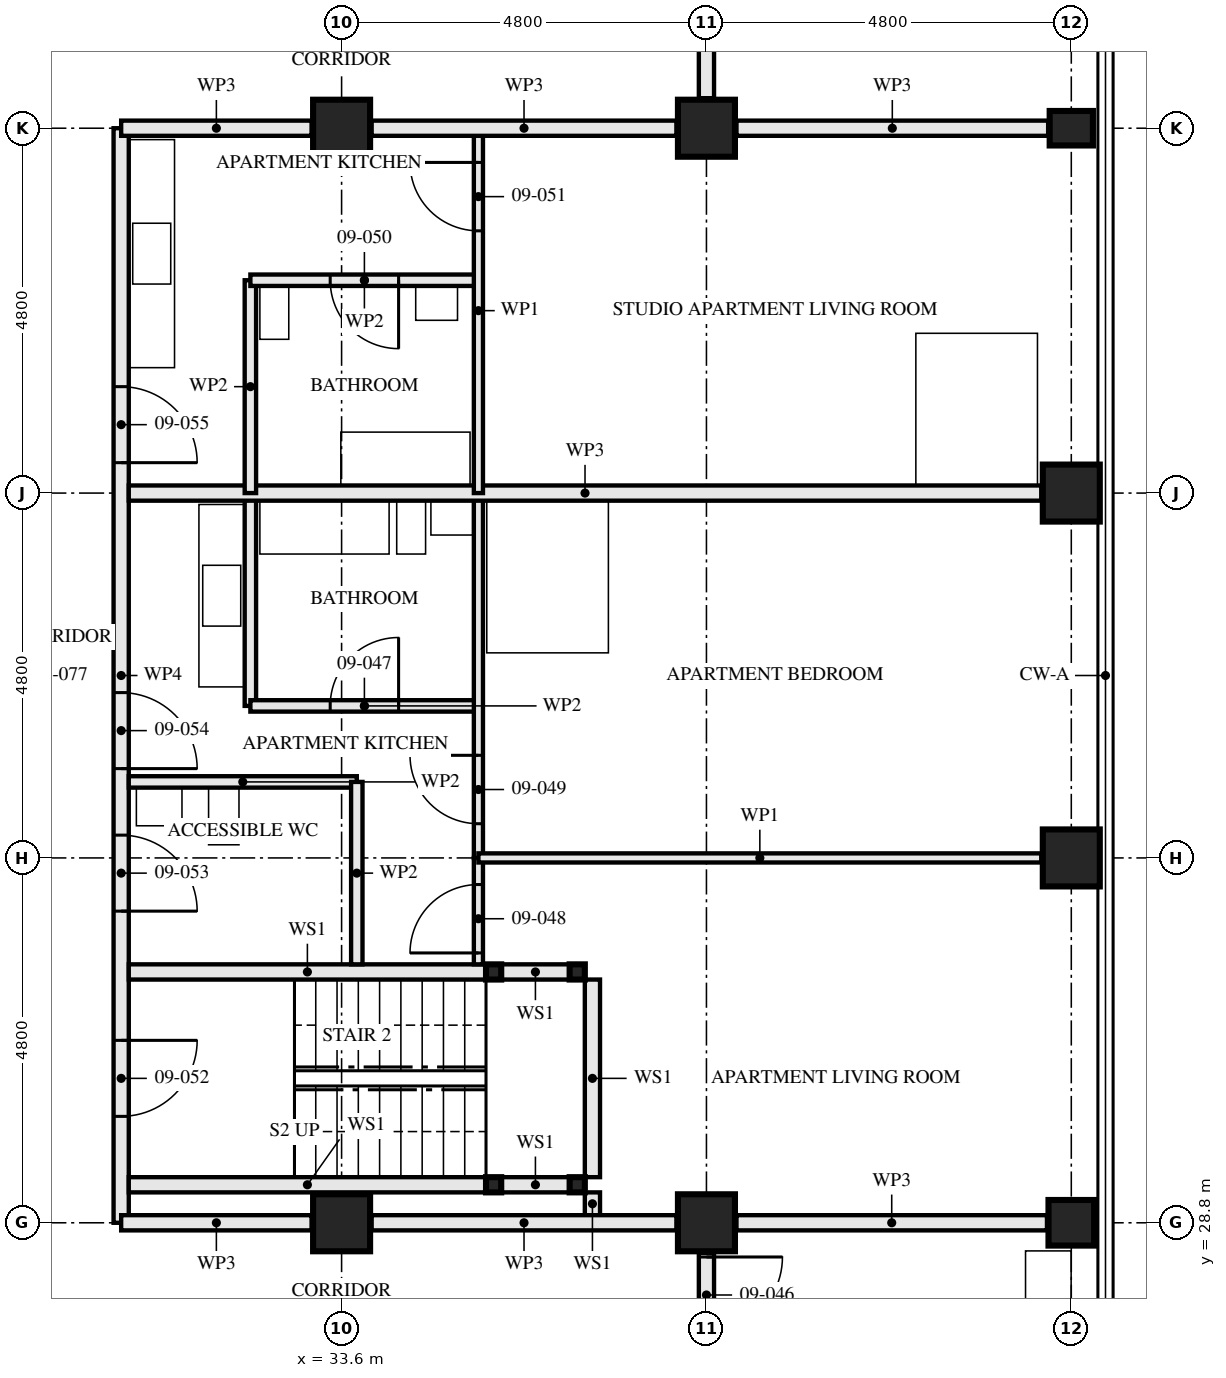
"""IFC4 building model, lengths in metres.
Left out: names, types, materials, properties, quantities, classifications, styles, units other than length and angle.
Written with IfcOpenShell. Run it as: python <this file> out.ifc"""

import sys

from ifc_helpers import new_model, si_unit, direction, frame, frame_2d, origin, origin_2d, place, context, subcontext, project, spatial, rectangle, hollow_rectangle, i_section, extrude, element, fill, save


model = new_model("IFC4")
c1 = context("Model", 3, precision=1e-05, world=origin(), true_north=direction((0.0, 1.0)))
c2 = subcontext(c1, "Body", "Model", "MODEL_VIEW")
j1 = project(units=[si_unit("LENGTHUNIT", "METRE"), si_unit("PLANEANGLEUNIT", "RADIAN")], contexts=[c1])
p1 = place(None, origin())
s1 = spatial("IfcSite", under=j1, at=p1, CompositionType="ELEMENT")
p2 = place(p1, origin())
s2 = spatial("IfcBuilding", under=s1, at=p2, CompositionType="ELEMENT")
p3 = place(p2, frame((0.0, 0.0, 37.5)))
s3 = spatial("IfcBuildingStorey", under=s2, at=p3, CompositionType="ELEMENT", Elevation=37.5)
for number, where, z_axis, x_axis in (
    (1, (33.6, 28.8, 0.0), (0.0, 0.0, 1.0), (0.0, 1.0, 0.0)),
    (2, (33.6, 43.2, 0.0), (0.0, 0.0, 1.0), (0.0, 1.0, 0.0)),
    (3, (38.4, 28.8, 0.0), (0.0, 0.0, 1.0), (0.0, 1.0, 0.0)),
    (4, (38.4, 43.2, 0.0), (0.0, 0.0, 1.0), (0.0, 1.0, 0.0)),
):
    element("IfcColumn", number, at=place(p3, frame(where, z_axis=z_axis, x_axis=x_axis)), inside=s3, PredefinedType="COLUMN", context=c2, shape_type="SweptSolid", body=[
        extrude(hollow_rectangle(XDim=0.75, YDim=0.75, WallThickness=0.08, at=origin_2d()), origin(), (0.0, 0.0, 1.0), 3.5),
    ])
p4 = place(p3, frame((43.2, 28.8, 0.0), z_axis=(0.0, 0.0, 1.0), x_axis=(0.0, 1.0, 0.0)))
e5 = element("IfcColumn", 5, at=p4, inside=s3, PredefinedType="COLUMN", context=c2, shape_type="SweptSolid", body=[
    extrude(hollow_rectangle(XDim=0.6, YDim=0.6, WallThickness=0.08, at=origin_2d()), origin(), (0.0, 0.0, 1.0), 3.5),
])
for number, where, z_axis, x_axis in (
    (6, (43.2, 33.6, 0.0), (0.0, 0.0, 1.0), (1.0, 0.0, 0.0)),
    (7, (43.2, 38.4, 0.0), (0.0, 0.0, 1.0), (1.0, 0.0, 0.0)),
):
    element("IfcColumn", number, at=place(p3, frame(where, z_axis=z_axis, x_axis=x_axis)), inside=s3, PredefinedType="COLUMN", context=c2, shape_type="SweptSolid", body=[
        extrude(hollow_rectangle(XDim=0.75, YDim=0.75, WallThickness=0.08, at=origin_2d()), origin(), (0.0, 0.0, 1.0), 3.5),
    ])
p5 = place(p3, frame((43.2, 43.2, 0.0), z_axis=(0.0, 0.0, 1.0), x_axis=(0.0, 1.0, 0.0)))
e8 = element("IfcColumn", 8, at=p5, inside=s3, PredefinedType="COLUMN", context=c2, shape_type="SweptSolid", body=[
    extrude(i_section(OverallWidth=0.454, OverallDepth=0.569, WebThickness=0.078, FlangeThickness=0.125, FilletRadius=0.015, at=origin_2d()), origin(), (0.0, 0.0, 1.0), 3.5),
])
for number, where, z_axis, x_axis in (
    (9, (36.7, 29.3, 0.0), (0.0, 0.0, 1.0), (1.0, 0.0, 0.0)),
    (10, (36.7, 32.1, 0.0), (0.0, 0.0, 1.0), (1.0, 0.0, 0.0)),
    (11, (35.6, 29.3, 0.0), (0.0, 0.0, 1.0), (1.0, 0.0, 0.0)),
    (12, (35.6, 32.1, 0.0), (0.0, 0.0, 1.0), (1.0, 0.0, 0.0)),
):
    element("IfcColumn", number, at=place(p3, frame(where, z_axis=z_axis, x_axis=x_axis)), inside=s3, PredefinedType="COLUMN", context=c2, shape_type="SweptSolid", body=[
        extrude(hollow_rectangle(XDim=0.2, YDim=0.2, WallThickness=0.008, at=origin_2d()), origin(), (0.0, 0.0, 1.0), 3.33),
    ])
p6 = place(p3, frame((38.4, 26.8, 0.0), z_axis=(0.0, 0.0, 1.0), x_axis=(0.0, 1.0, 0.0)))
e13 = element("IfcWall", 13, at=p6, inside=s3, PredefinedType="PARTITIONING", context=c2, shape_type="SweptSolid", body=[
    extrude(rectangle(XDim=1.605, YDim=0.2, at=frame_2d((0.802, 0.0))), origin(), (0.0, 0.0, 1.0), 3.33),
])
p7 = place(p6, frame((0.55, 0.0, 0.0)))
e14 = element("IfcOpeningElement", 14, at=p7, cuts=e13, PredefinedType="OPENING", context=c2, shape_type="SweptSolid", body=[
    extrude(rectangle(XDim=1.0, YDim=2.1, at=frame_2d((0.5, 1.05))), frame((0.0, 0.111, 0.0), z_axis=(0.0, -1.0, 0.0), x_axis=(1.0, 0.0, 0.0)), (0.0, 0.0, 1.0), 0.221),
])
p8 = place(p3, frame((36.6, 29.3, 0.0), z_axis=(0.0, 0.0, 1.0), x_axis=(-1.0, 0.0, 0.0)))
e15 = element("IfcWall", 15, at=p8, inside=s3, PredefinedType="SOLIDWALL", context=c2, shape_type="SweptSolid", body=[
    extrude(rectangle(XDim=0.9, YDim=0.2, at=frame_2d((0.45, 0.0))), origin(), (0.0, 0.0, 1.0), 2.99),
])
p9 = place(p3, frame((35.5, 29.3, 0.0), z_axis=(0.0, 0.0, 1.0), x_axis=(-1.0, 0.0, 0.0)))
e16 = element("IfcWall", 16, at=p9, inside=s3, PredefinedType="SOLIDWALL", context=c2, shape_type="SweptSolid", body=[
    extrude(rectangle(XDim=4.7, YDim=0.2, at=frame_2d((2.35, 0.0))), origin(), (0.0, 0.0, 1.0), 2.99),
])
p10 = place(p3, frame((36.6, 32.1, 0.0), z_axis=(0.0, 0.0, 1.0), x_axis=(-1.0, 0.0, 0.0)))
e17 = element("IfcWall", 17, at=p10, inside=s3, PredefinedType="SOLIDWALL", context=c2, shape_type="SweptSolid", body=[
    extrude(rectangle(XDim=0.9, YDim=0.2, at=frame_2d((0.45, 0.0))), origin(), (0.0, 0.0, 1.0), 2.99),
])
p11 = place(p3, frame((35.5, 32.1, 0.0), z_axis=(0.0, 0.0, 1.0), x_axis=(-1.0, 0.0, 0.0)))
e18 = element("IfcWall", 18, at=p11, inside=s3, PredefinedType="SOLIDWALL", context=c2, shape_type="SweptSolid", body=[
    extrude(rectangle(XDim=4.7, YDim=0.2, at=frame_2d((2.35, 0.0))), origin(), (0.0, 0.0, 1.0), 2.99),
])
p12 = place(p3, frame((36.9, 28.9, 0.0), z_axis=(0.0, 0.0, 1.0), x_axis=(0.0, 1.0, 0.0)))
e19 = element("IfcWall", 19, at=p12, inside=s3, PredefinedType="SOLIDWALL", context=c2, shape_type="SweptSolid", body=[
    extrude(rectangle(XDim=0.3, YDim=0.2, at=frame_2d((0.15, 0.0))), origin(), (0.0, 0.0, 1.0), 3.33),
])
p13 = place(p3, frame((36.9, 29.4, 0.0), z_axis=(0.0, 0.0, 1.0), x_axis=(0.0, 1.0, 0.0)))
e20 = element("IfcWall", 20, at=p13, inside=s3, PredefinedType="SOLIDWALL", context=c2, shape_type="SweptSolid", body=[
    extrude(rectangle(XDim=2.6, YDim=0.2, at=frame_2d((1.3, 0.0))), origin(), (0.0, 0.0, 1.0), 3.33),
])
p14 = place(p3, frame((33.8, 32.2, 0.0), z_axis=(0.0, 0.0, 1.0), x_axis=(0.0, 1.0, 0.0)))
e21 = element("IfcWall", 21, at=p14, inside=s3, PredefinedType="PARTITIONING", context=c2, shape_type="SweptSolid", body=[
    extrude(rectangle(XDim=2.4, YDim=0.15, at=frame_2d((1.2, 0.0))), origin(), (0.0, 0.0, 1.0), 2.55),
])
p15 = place(p3, frame((33.8, 34.6, 0.0), z_axis=(0.0, 0.0, 1.0), x_axis=(-1.0, 0.0, 0.0)))
e22 = element("IfcWall", 22, at=p15, inside=s3, PredefinedType="PARTITIONING", context=c2, shape_type="SweptSolid", body=[
    extrude(rectangle(XDim=3.0, YDim=0.15, at=frame_2d((1.5, 0.0))), origin(), (0.0, 0.0, 1.0), 3.33),
])
p16 = place(p3, frame((35.4, 35.6, 0.0), z_axis=(0.0, 0.0, 1.0), x_axis=(-1.0, 0.0, 0.0)))
e23 = element("IfcWall", 23, at=p16, inside=s3, PredefinedType="PARTITIONING", context=c2, shape_type="SweptSolid", body=[
    extrude(rectangle(XDim=3.0, YDim=0.15, at=frame_2d((1.5, 0.0))), origin(), (0.0, 0.0, 1.0), 3.33),
])
p17 = place(p16, frame((1.05, 0.0, 0.0)))
e24 = element("IfcOpeningElement", 24, at=p17, cuts=e23, PredefinedType="OPENING", context=c2, shape_type="SweptSolid", body=[
    extrude(rectangle(XDim=0.9, YDim=2.1, at=frame_2d((0.45, 1.05))), frame((0.0, 0.085, 0.0), z_axis=(0.0, -1.0, 0.0), x_axis=(1.0, 0.0, 0.0)), (0.0, 0.0, 1.0), 0.171),
])
p18 = place(p3, frame((32.4, 35.6, 0.0), z_axis=(0.0, 0.0, 1.0), x_axis=(0.0, 1.0, 0.0)))
e25 = element("IfcWall", 25, at=p18, inside=s3, PredefinedType="PARTITIONING", context=c2, shape_type="SweptSolid", body=[
    extrude(rectangle(XDim=2.8, YDim=0.15, at=frame_2d((1.4, 0.0))), origin(), (0.0, 0.0, 1.0), 3.33),
])
p19 = place(p3, frame((35.4, 32.2, 0.0), z_axis=(0.0, 0.0, 1.0), x_axis=(0.0, 1.0, 0.0)))
e26 = element("IfcWall", 26, at=p19, inside=s3, PredefinedType="PARTITIONING", context=c2, shape_type="SweptSolid", body=[
    extrude(rectangle(XDim=1.4, YDim=0.12, at=frame_2d((0.7, 0.0))), origin(), (0.0, 0.0, 1.0), 3.33),
])
p20 = place(p19, frame((0.15, 0.0, 0.0)))
e27 = element("IfcOpeningElement", 27, at=p20, cuts=e26, PredefinedType="OPENING", context=c2, shape_type="SweptSolid", body=[
    extrude(rectangle(XDim=0.9, YDim=2.1, at=frame_2d((0.45, 1.05))), frame((0.0, 0.071, 0.0), z_axis=(0.0, -1.0, 0.0), x_axis=(1.0, 0.0, 0.0)), (0.0, 0.0, 1.0), 0.141),
])
p21 = place(p3, frame((35.4, 33.6, 0.0), z_axis=(0.0, 0.0, 1.0), x_axis=(0.0, 1.0, 0.0)))
e28 = element("IfcWall", 28, at=p21, inside=s3, PredefinedType="PARTITIONING", context=c2, shape_type="SweptSolid", body=[
    extrude(rectangle(XDim=4.8, YDim=0.12, at=frame_2d((2.4, 0.0))), origin(), (0.0, 0.0, 1.0), 3.33),
])
p22 = place(p21, frame((0.45, 0.0, 0.0)))
e29 = element("IfcOpeningElement", 29, at=p22, cuts=e28, PredefinedType="OPENING", context=c2, shape_type="SweptSolid", body=[
    extrude(rectangle(XDim=0.9, YDim=2.1, at=frame_2d((0.45, 1.05))), frame((0.0, 0.071, 0.0), z_axis=(0.0, -1.0, 0.0), x_axis=(1.0, 0.0, 0.0)), (0.0, 0.0, 1.0), 0.141),
])
p23 = place(p3, frame((42.805, 33.6, 0.0), z_axis=(0.0, 0.0, 1.0), x_axis=(-1.0, 0.0, 0.0)))
e30 = element("IfcWall", 30, at=p23, inside=s3, PredefinedType="PARTITIONING", context=c2, shape_type="SweptSolid", body=[
    extrude(rectangle(XDim=7.405, YDim=0.12, at=frame_2d((3.703, 0.0))), origin(), (0.0, 0.0, 1.0), 2.55),
])
p24 = place(p3, frame((42.805, 38.4, 0.0), z_axis=(0.0, 0.0, 1.0), x_axis=(-1.0, 0.0, 0.0)))
e31 = element("IfcWall", 31, at=p24, inside=s3, PredefinedType="PARTITIONING", context=c2, shape_type="SweptSolid", body=[
    extrude(rectangle(XDim=12.005, YDim=0.2, at=frame_2d((6.002, 0.0))), origin(), (0.0, 0.0, 1.0), 2.55),
])
p25 = place(p3, frame((35.4, 41.2, 0.0), z_axis=(0.0, 0.0, 1.0), x_axis=(-1.0, 0.0, 0.0)))
e32 = element("IfcWall", 32, at=p25, inside=s3, PredefinedType="PARTITIONING", context=c2, shape_type="SweptSolid", body=[
    extrude(rectangle(XDim=3.0, YDim=0.15, at=frame_2d((1.5, 0.0))), origin(), (0.0, 0.0, 1.0), 3.33),
])
p26 = place(p25, frame((1.05, 0.0, 0.0)))
e33 = element("IfcOpeningElement", 33, at=p26, cuts=e32, PredefinedType="OPENING", context=c2, shape_type="SweptSolid", body=[
    extrude(rectangle(XDim=0.9, YDim=2.1, at=frame_2d((0.45, 1.05))), frame((0.0, 0.085, 0.0), z_axis=(0.0, -1.0, 0.0), x_axis=(1.0, 0.0, 0.0)), (0.0, 0.0, 1.0), 0.171),
])
p27 = place(p3, frame((32.4, 38.4, 0.0), z_axis=(0.0, 0.0, 1.0), x_axis=(0.0, 1.0, 0.0)))
e34 = element("IfcWall", 34, at=p27, inside=s3, PredefinedType="PARTITIONING", context=c2, shape_type="SweptSolid", body=[
    extrude(rectangle(XDim=2.8, YDim=0.15, at=frame_2d((1.4, 0.0))), origin(), (0.0, 0.0, 1.0), 3.33),
])
p28 = place(p3, frame((35.4, 38.4, 0.0), z_axis=(0.0, 0.0, 1.0), x_axis=(0.0, 1.0, 0.0)))
e35 = element("IfcWall", 35, at=p28, inside=s3, PredefinedType="PARTITIONING", context=c2, shape_type="SweptSolid", body=[
    extrude(rectangle(XDim=4.8, YDim=0.12, at=frame_2d((2.4, 0.0))), origin(), (0.0, 0.0, 1.0), 3.33),
])
p29 = place(p28, frame((3.45, 0.0, 0.0)))
e36 = element("IfcOpeningElement", 36, at=p29, cuts=e35, PredefinedType="OPENING", context=c2, shape_type="SweptSolid", body=[
    extrude(rectangle(XDim=0.9, YDim=2.1, at=frame_2d((0.45, 1.05))), frame((0.0, 0.071, 0.0), z_axis=(0.0, -1.0, 0.0), x_axis=(1.0, 0.0, 0.0)), (0.0, 0.0, 1.0), 0.141),
])
p30 = place(p3, frame((30.7, 28.8, 0.0), z_axis=(0.0, 0.0, 1.0), x_axis=(0.0, 1.0, 0.0)))
e37 = element("IfcWall", 37, at=p30, inside=s3, PredefinedType="PARTITIONING", context=c2, shape_type="SweptSolid", body=[
    extrude(rectangle(XDim=14.4, YDim=0.2, at=frame_2d((7.2, 0.0))), origin(), (0.0, 0.0, 1.0), 2.55),
])
p31 = place(p30, frame((1.4, 0.0, 0.0)))
e38 = element("IfcOpeningElement", 38, at=p31, cuts=e37, PredefinedType="OPENING", context=c2, shape_type="SweptSolid", body=[
    extrude(rectangle(XDim=1.0, YDim=2.1, at=frame_2d((0.5, 1.05))), frame((0.0, 0.111, 0.0), z_axis=(0.0, -1.0, 0.0), x_axis=(1.0, 0.0, 0.0)), (0.0, 0.0, 1.0), 0.221),
])
p32 = place(p30, frame((4.1, 0.0, 0.0)))
e39 = element("IfcOpeningElement", 39, at=p32, cuts=e37, PredefinedType="OPENING", context=c2, shape_type="SweptSolid", body=[
    extrude(rectangle(XDim=1.0, YDim=2.1, at=frame_2d((0.5, 1.05))), frame((0.0, 0.111, 0.0), z_axis=(0.0, -1.0, 0.0), x_axis=(1.0, 0.0, 0.0)), (0.0, 0.0, 1.0), 0.221),
])
p33 = place(p30, frame((5.975, 0.0, 0.0)))
e40 = element("IfcOpeningElement", 40, at=p33, cuts=e37, PredefinedType="OPENING", context=c2, shape_type="SweptSolid", body=[
    extrude(rectangle(XDim=1.0, YDim=2.1, at=frame_2d((0.5, 1.05))), frame((0.0, 0.111, 0.0), z_axis=(0.0, -1.0, 0.0), x_axis=(1.0, 0.0, 0.0)), (0.0, 0.0, 1.0), 0.221),
])
p34 = place(p30, frame((10.0, 0.0, 0.0)))
e41 = element("IfcOpeningElement", 41, at=p34, cuts=e37, PredefinedType="OPENING", context=c2, shape_type="SweptSolid", body=[
    extrude(rectangle(XDim=1.0, YDim=2.1, at=frame_2d((0.5, 1.05))), frame((0.0, 0.111, 0.0), z_axis=(0.0, -1.0, 0.0), x_axis=(1.0, 0.0, 0.0)), (0.0, 0.0, 1.0), 0.221),
])
p35 = place(p3, frame((38.4, 45.2, 0.0), z_axis=(0.0, 0.0, 1.0), x_axis=(0.0, -1.0, 0.0)))
e42 = element("IfcWall", 42, at=p35, inside=s3, PredefinedType="PARTITIONING", context=c2, shape_type="SweptSolid", body=[
    extrude(rectangle(XDim=1.605, YDim=0.2, at=frame_2d((0.802, 0.0))), origin(), (0.0, 0.0, 1.0), 3.33),
])
p36 = place(p3, frame((42.88, 28.8, 0.0), z_axis=(0.0, 0.0, 1.0), x_axis=(-1.0, 0.0, 0.0)))
e43 = element("IfcWall", 43, at=p36, inside=s3, PredefinedType="PARTITIONING", context=c2, shape_type="SweptSolid", body=[
    extrude(rectangle(XDim=4.085, YDim=0.2, at=frame_2d((2.042, 0.0))), origin(), (0.0, 0.0, 1.0), 2.32),
])
p37 = place(p3, frame((38.005, 28.8, 0.0), z_axis=(0.0, 0.0, 1.0), x_axis=(-1.0, 0.0, 0.0)))
e44 = element("IfcWall", 44, at=p37, inside=s3, PredefinedType="PARTITIONING", context=c2, shape_type="SweptSolid", body=[
    extrude(rectangle(XDim=4.01, YDim=0.2, at=frame_2d((2.005, 0.0))), origin(), (0.0, 0.0, 1.0), 2.32),
])
p38 = place(p3, frame((33.205, 28.8, 0.0), z_axis=(0.0, 0.0, 1.0), x_axis=(-1.0, 0.0, 0.0)))
e45 = element("IfcWall", 45, at=p38, inside=s3, PredefinedType="PARTITIONING", context=c2, shape_type="SweptSolid", body=[
    extrude(rectangle(XDim=2.505, YDim=0.2, at=frame_2d((1.252, 0.0))), origin(), (0.0, 0.0, 1.0), 2.32),
])
p39 = place(p3, frame((42.896, 43.2, 0.0), z_axis=(0.0, 0.0, 1.0), x_axis=(-1.0, 0.0, 0.0)))
e46 = element("IfcWall", 46, at=p39, inside=s3, PredefinedType="PARTITIONING", context=c2, shape_type="SweptSolid", body=[
    extrude(rectangle(XDim=4.101, YDim=0.2, at=frame_2d((2.05, 0.0))), origin(), (0.0, 0.0, 1.0), 2.32),
])
p40 = place(p3, frame((38.005, 43.2, 0.0), z_axis=(0.0, 0.0, 1.0), x_axis=(-1.0, 0.0, 0.0)))
e47 = element("IfcWall", 47, at=p40, inside=s3, PredefinedType="PARTITIONING", context=c2, shape_type="SweptSolid", body=[
    extrude(rectangle(XDim=4.01, YDim=0.2, at=frame_2d((2.005, 0.0))), origin(), (0.0, 0.0, 1.0), 2.32),
])
p41 = place(p3, frame((33.205, 43.2, 0.0), z_axis=(0.0, 0.0, 1.0), x_axis=(-1.0, 0.0, 0.0)))
e48 = element("IfcWall", 48, at=p41, inside=s3, PredefinedType="PARTITIONING", context=c2, shape_type="SweptSolid", body=[
    extrude(rectangle(XDim=2.505, YDim=0.2, at=frame_2d((1.252, 0.0))), origin(), (0.0, 0.0, 1.0), 2.32),
])
p42 = place(p7, frame((1.0, 0.0, 0.0), z_axis=(0.0, 0.0, 1.0), x_axis=(-1.0, 0.0, 0.0)))
e49 = element("IfcDoor", 49, at=p42, inside=s3, OperationType="SINGLE_SWING_RIGHT", PredefinedType="DOOR", context=c2, shape_type="SweptSolid", body=[
    extrude(rectangle(XDim=1.0, YDim=2.1, at=frame_2d((0.5, 1.05))), frame((0.0, 0.027, 0.0), z_axis=(0.0, -1.0, 0.0), x_axis=(1.0, 0.0, 0.0)), (0.0, 0.0, 1.0), 0.054),
])
fill(e14, e49)
p43 = place(p17, frame((0.9, 0.0, 0.0), z_axis=(0.0, 0.0, 1.0), x_axis=(-1.0, 0.0, 0.0)))
e50 = element("IfcDoor", 50, at=p43, inside=s3, OperationType="SINGLE_SWING_LEFT", PredefinedType="DOOR", context=c2, shape_type="SweptSolid", body=[
    extrude(rectangle(XDim=0.9, YDim=2.1, at=frame_2d((0.45, 1.05))), frame((0.0, 0.022, 0.0), z_axis=(0.0, -1.0, 0.0), x_axis=(1.0, 0.0, 0.0)), (0.0, 0.0, 1.0), 0.044),
])
fill(e24, e50)
p44 = place(p20, origin())
e51 = element("IfcDoor", 51, at=p44, inside=s3, OperationType="SINGLE_SWING_RIGHT", PredefinedType="DOOR", context=c2, shape_type="SweptSolid", body=[
    extrude(rectangle(XDim=0.9, YDim=2.1, at=frame_2d((0.45, 1.05))), frame((0.0, 0.022, 0.0), z_axis=(0.0, -1.0, 0.0), x_axis=(1.0, 0.0, 0.0)), (0.0, 0.0, 1.0), 0.044),
])
fill(e27, e51)
p45 = place(p22, origin())
e52 = element("IfcDoor", 52, at=p45, inside=s3, OperationType="SINGLE_SWING_LEFT", PredefinedType="DOOR", context=c2, shape_type="SweptSolid", body=[
    extrude(rectangle(XDim=0.9, YDim=2.1, at=frame_2d((0.45, 1.05))), frame((0.0, 0.022, 0.0), z_axis=(0.0, -1.0, 0.0), x_axis=(1.0, 0.0, 0.0)), (0.0, 0.0, 1.0), 0.044),
])
fill(e29, e52)
p46 = place(p26, origin())
e53 = element("IfcDoor", 53, at=p46, inside=s3, OperationType="SINGLE_SWING_RIGHT", PredefinedType="DOOR", context=c2, shape_type="SweptSolid", body=[
    extrude(rectangle(XDim=0.9, YDim=2.1, at=frame_2d((0.45, 1.05))), frame((0.0, 0.022, 0.0), z_axis=(0.0, -1.0, 0.0), x_axis=(1.0, 0.0, 0.0)), (0.0, 0.0, 1.0), 0.044),
])
fill(e33, e53)
p47 = place(p29, origin())
e54 = element("IfcDoor", 54, at=p47, inside=s3, OperationType="SINGLE_SWING_LEFT", PredefinedType="DOOR", context=c2, shape_type="SweptSolid", body=[
    extrude(rectangle(XDim=0.9, YDim=2.1, at=frame_2d((0.45, 1.05))), frame((0.0, 0.022, 0.0), z_axis=(0.0, -1.0, 0.0), x_axis=(1.0, 0.0, 0.0)), (0.0, 0.0, 1.0), 0.044),
])
fill(e36, e54)
p48 = place(p31, frame((1.0, 0.0, 0.0), z_axis=(0.0, 0.0, 1.0), x_axis=(-1.0, 0.0, 0.0)))
e55 = element("IfcDoor", 55, at=p48, inside=s3, OperationType="SINGLE_SWING_RIGHT", PredefinedType="DOOR", context=c2, shape_type="SweptSolid", body=[
    extrude(rectangle(XDim=1.0, YDim=2.1, at=frame_2d((0.5, 1.05))), frame((0.0, 0.032, 0.0), z_axis=(0.0, -1.0, 0.0), x_axis=(1.0, 0.0, 0.0)), (0.0, 0.0, 1.0), 0.064),
])
fill(e38, e55)
p49 = place(p32, frame((1.0, 0.0, 0.0), z_axis=(0.0, 0.0, 1.0), x_axis=(-1.0, 0.0, 0.0)))
e56 = element("IfcDoor", 56, at=p49, inside=s3, OperationType="SINGLE_SWING_LEFT", PredefinedType="DOOR", context=c2, shape_type="SweptSolid", body=[
    extrude(rectangle(XDim=1.0, YDim=2.1, at=frame_2d((0.5, 1.05))), frame((0.0, 0.027, 0.0), z_axis=(0.0, -1.0, 0.0), x_axis=(1.0, 0.0, 0.0)), (0.0, 0.0, 1.0), 0.054),
])
fill(e39, e56)
p50 = place(p33, frame((1.0, 0.0, 0.0), z_axis=(0.0, 0.0, 1.0), x_axis=(-1.0, 0.0, 0.0)))
e57 = element("IfcDoor", 57, at=p50, inside=s3, OperationType="SINGLE_SWING_LEFT", PredefinedType="DOOR", context=c2, shape_type="SweptSolid", body=[
    extrude(rectangle(XDim=1.0, YDim=2.1, at=frame_2d((0.5, 1.05))), frame((0.0, 0.027, 0.0), z_axis=(0.0, -1.0, 0.0), x_axis=(1.0, 0.0, 0.0)), (0.0, 0.0, 1.0), 0.054),
])
fill(e40, e57)
p51 = place(p34, frame((1.0, 0.0, 0.0), z_axis=(0.0, 0.0, 1.0), x_axis=(-1.0, 0.0, 0.0)))
e58 = element("IfcDoor", 58, at=p51, inside=s3, OperationType="SINGLE_SWING_LEFT", PredefinedType="DOOR", context=c2, shape_type="SweptSolid", body=[
    extrude(rectangle(XDim=1.0, YDim=2.1, at=frame_2d((0.5, 1.05))), frame((0.0, 0.027, 0.0), z_axis=(0.0, -1.0, 0.0), x_axis=(1.0, 0.0, 0.0)), (0.0, 0.0, 1.0), 0.054),
])
fill(e41, e58)
save(model, sys.argv[1])
